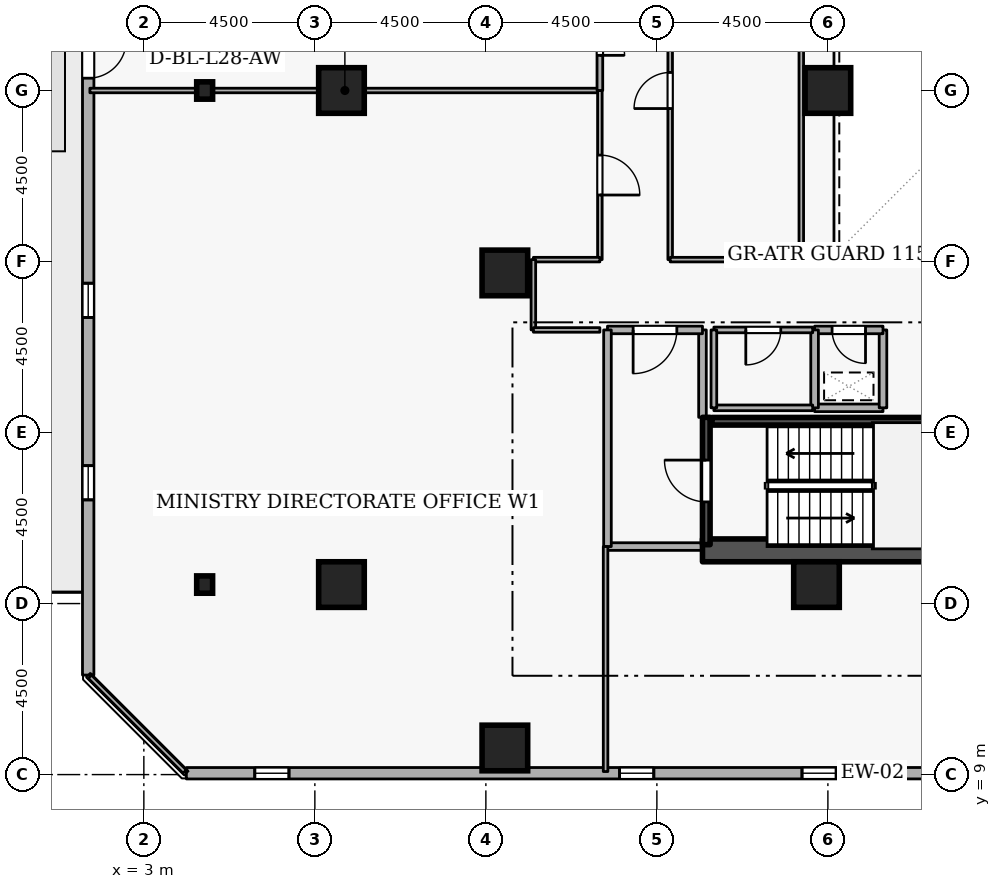
"""IFC4 building model, lengths in metres.
Left out: names, types, materials, properties, quantities, classifications, styles, units other than length and angle.
Written with IfcOpenShell. Run it as: python <this file> out.ifc"""

import sys

from ifc_helpers import new_model, si_unit, direction, frame, frame_2d, origin, origin_2d, place, context, subcontext, project, spatial, rectangle, i_section, extrude, element, fill, save


model = new_model("IFC4")
c1 = context("Model", 3, precision=1e-05, world=origin(), true_north=direction((0.0, 1.0)))
c2 = subcontext(c1, "Body", "Model", "MODEL_VIEW")
j1 = project(units=[si_unit("LENGTHUNIT", "METRE"), si_unit("PLANEANGLEUNIT", "RADIAN")], contexts=[c1])
p1 = place(None, origin())
s1 = spatial("IfcSite", under=j1, at=p1, CompositionType="ELEMENT")
p2 = place(p1, origin())
s2 = spatial("IfcBuilding", under=s1, at=p2, CompositionType="ELEMENT")
p3 = place(p2, frame((0.0, 0.0, 108.9)))
s3 = spatial("IfcBuildingStorey", under=s2, at=p3, CompositionType="ELEMENT", Elevation=108.9)
p4 = place(p3, frame((17.7, 14.9, 0.0), z_axis=(0.0, 0.0, 1.0), x_axis=(1.0, 0.0, 0.0)))
e1 = element("IfcWall", 1, at=p4, inside=s3, PredefinedType="SHEAR", context=c2, shape_type="SweptSolid", body=[
    extrude(rectangle(XDim=15.6, YDim=0.6, at=frame_2d((7.8, 0.0))), origin(), (0.0, 0.0, 1.0), 3.6),
])
for number, where, z_axis, x_axis in (
    (2, (12.5, 9.7, 0.0), (0.0, 0.0, 1.0), (1.0, 0.0, 0.0)),
    (3, (8.2, 14.0, 0.0), (0.0, 0.0, 1.0), (1.0, 0.0, 0.0)),
    (4, (8.2, 27.0, 0.0), (0.0, 0.0, 1.0), (1.0, 0.0, 0.0)),
    (5, (12.5, 22.2, 0.0), (0.0, 0.0, 1.0), (1.0, 0.0, 0.0)),
    (6, (20.7, 14.0, 0.0), (0.0, 0.0, 1.0), (1.0, 0.0, 0.0)),
    (7, (21.0, 27.0, 0.0), (0.0, 0.0, 1.0), (1.0, 0.0, 0.0)),
):
    element("IfcColumn", number, at=place(p3, frame(where, z_axis=z_axis, x_axis=x_axis)), inside=s3, PredefinedType="COLUMN", context=c2, shape_type="SweptSolid", body=[
        extrude(rectangle(XDim=1.2, YDim=1.2, at=origin_2d()), origin(), (0.0, 0.0, 1.0), 3.6),
    ])
for number, where, z_axis, x_axis in (
    (8, (4.6, 14.0, 0.0), (0.0, 0.0, 1.0), (1.0, 0.0, 0.0)),
    (9, (4.6, 27.0, 0.0), (0.0, 0.0, 1.0), (1.0, 0.0, 0.0)),
):
    element("IfcColumn", number, at=place(p3, frame(where, z_axis=z_axis, x_axis=x_axis)), inside=s3, PredefinedType="COLUMN", context=c2, shape_type="SweptSolid", body=[
        extrude(i_section(OverallWidth=0.418, OverallDepth=0.456, WebThickness=0.042, FlangeThickness=0.067, FilletRadius=0.015, at=origin_2d()), origin(), (0.0, 0.0, 1.0), 3.6),
    ])
p5 = place(p3, frame((4.119, 9.035, 0.0), z_axis=(0.0, 0.0, 1.0), x_axis=(0.999999998537, 5.4088042e-05, 0.0)))
e10 = element("IfcWall", 10, at=p5, inside=s3, PredefinedType="STANDARD", context=c2, shape_type="SweptSolid", body=[
    extrude(rectangle(XDim=36.11, YDim=0.3, at=frame_2d((18.055, 0.0))), origin(), (0.0, 0.0, 1.0), 2.7),
])
p6 = place(p5, frame((1.8, 0.0, 0.72)))
e11 = element("IfcOpeningElement", 11, at=p6, cuts=e10, PredefinedType="OPENING", context=c2, shape_type="SweptSolid", body=[
    extrude(rectangle(XDim=0.9, YDim=1.75, at=frame_2d((0.45, 0.875))), frame((0.0, 0.16, 0.0), z_axis=(0.0, -1.0, 0.0), x_axis=(1.0, 0.0, 0.0)), (0.0, 0.0, 1.0), 0.32),
])
p7 = place(p5, frame((11.4, 0.0, 0.72)))
e12 = element("IfcOpeningElement", 12, at=p7, cuts=e10, PredefinedType="OPENING", context=c2, shape_type="SweptSolid", body=[
    extrude(rectangle(XDim=0.9, YDim=1.75, at=frame_2d((0.45, 0.875))), frame((0.0, 0.16, 0.0), z_axis=(0.0, -1.0, 0.0), x_axis=(1.0, 0.0, 0.0)), (0.0, 0.0, 1.0), 0.32),
])
p8 = place(p5, frame((16.2, 0.0, 0.72)))
e13 = element("IfcOpeningElement", 13, at=p8, cuts=e10, PredefinedType="OPENING", context=c2, shape_type="SweptSolid", body=[
    extrude(rectangle(XDim=0.9, YDim=1.75, at=frame_2d((0.45, 0.875))), frame((0.0, 0.16, 0.0), z_axis=(0.0, -1.0, 0.0), x_axis=(1.0, 0.0, 0.0)), (0.0, 0.0, 1.0), 0.32),
])
p9 = place(p5, frame((25.8, 0.0, 0.72)))
e14 = element("IfcOpeningElement", 14, at=p9, cuts=e10, PredefinedType="OPENING", context=c2, shape_type="SweptSolid", body=[
    extrude(rectangle(XDim=0.9, YDim=1.75, at=frame_2d((0.45, 0.875))), frame((0.0, 0.16, 0.0), z_axis=(0.0, -1.0, 0.0), x_axis=(1.0, 0.0, 0.0)), (0.0, 0.0, 1.0), 0.32),
])
p10 = place(p5, frame((30.6, 0.0, 0.72)))
e15 = element("IfcOpeningElement", 15, at=p10, cuts=e10, PredefinedType="OPENING", context=c2, shape_type="SweptSolid", body=[
    extrude(rectangle(XDim=0.9, YDim=1.75, at=frame_2d((0.45, 0.875))), frame((0.0, 0.16, 0.0), z_axis=(0.0, -1.0, 0.0), x_axis=(1.0, 0.0, 0.0)), (0.0, 0.0, 1.0), 0.32),
])
p11 = place(p3, frame((1.537, 47.729, 0.0), z_axis=(0.0, 0.0, 1.0), x_axis=(-5.4088042e-05, -0.999999998537, 0.0)))
e16 = element("IfcWall", 16, at=p11, inside=s3, PredefinedType="STANDARD", context=c2, shape_type="SweptSolid", body=[
    extrude(rectangle(XDim=36.11, YDim=0.3, at=frame_2d((18.055, 0.0))), origin(), (0.0, 0.0, 1.0), 2.7),
])
p12 = place(p11, frame((19.405, 0.0, 0.0)))
e17 = element("IfcOpeningElement", 17, at=p12, cuts=e16, PredefinedType="OPENING", context=c2, shape_type="SweptSolid", body=[
    extrude(rectangle(XDim=1.0, YDim=2.08, at=frame_2d((0.5, 1.04))), frame((0.0, 0.16, 0.0), z_axis=(0.0, -1.0, 0.0), x_axis=(1.0, 0.0, 0.0)), (0.0, 0.0, 1.0), 0.32),
])
p13 = place(p11, frame((1.8, 0.0, 0.72)))
e18 = element("IfcOpeningElement", 18, at=p13, cuts=e16, PredefinedType="OPENING", context=c2, shape_type="SweptSolid", body=[
    extrude(rectangle(XDim=0.9, YDim=1.75, at=frame_2d((0.45, 0.875))), frame((0.0, 0.16, 0.0), z_axis=(0.0, -1.0, 0.0), x_axis=(1.0, 0.0, 0.0)), (0.0, 0.0, 1.0), 0.32),
])
p14 = place(p11, frame((11.4, 0.0, 0.72)))
e19 = element("IfcOpeningElement", 19, at=p14, cuts=e16, PredefinedType="OPENING", context=c2, shape_type="SweptSolid", body=[
    extrude(rectangle(XDim=0.9, YDim=1.75, at=frame_2d((0.45, 0.875))), frame((0.0, 0.16, 0.0), z_axis=(0.0, -1.0, 0.0), x_axis=(1.0, 0.0, 0.0)), (0.0, 0.0, 1.0), 0.32),
])
p15 = place(p11, frame((16.2, 0.0, 0.72)))
e20 = element("IfcOpeningElement", 20, at=p15, cuts=e16, PredefinedType="OPENING", context=c2, shape_type="SweptSolid", body=[
    extrude(rectangle(XDim=0.9, YDim=1.75, at=frame_2d((0.45, 0.875))), frame((0.0, 0.16, 0.0), z_axis=(0.0, -1.0, 0.0), x_axis=(1.0, 0.0, 0.0)), (0.0, 0.0, 1.0), 0.32),
])
p16 = place(p11, frame((25.8, 0.0, 0.72)))
e21 = element("IfcOpeningElement", 21, at=p16, cuts=e16, PredefinedType="OPENING", context=c2, shape_type="SweptSolid", body=[
    extrude(rectangle(XDim=0.9, YDim=1.75, at=frame_2d((0.45, 0.875))), frame((0.0, 0.16, 0.0), z_axis=(0.0, -1.0, 0.0), x_axis=(1.0, 0.0, 0.0)), (0.0, 0.0, 1.0), 0.32),
])
p17 = place(p11, frame((30.6, 0.0, 0.72)))
e22 = element("IfcOpeningElement", 22, at=p17, cuts=e16, PredefinedType="OPENING", context=c2, shape_type="SweptSolid", body=[
    extrude(rectangle(XDim=0.9, YDim=1.75, at=frame_2d((0.45, 0.875))), frame((0.0, 0.16, 0.0), z_axis=(0.0, -1.0, 0.0), x_axis=(1.0, 0.0, 0.0)), (0.0, 0.0, 1.0), 0.32),
])
p18 = place(p3, frame((17.8, 15.05, 0.0), z_axis=(0.0, 0.0, 1.0), x_axis=(0.0, 1.0, 0.0)))
e23 = element("IfcWall", 23, at=p18, inside=s3, PredefinedType="SHEAR", context=c2, shape_type="SweptSolid", body=[
    extrude(rectangle(XDim=3.35, YDim=0.2, at=frame_2d((1.675, 0.0))), origin(), (0.0, 0.0, 1.0), 3.6),
])
p19 = place(p18, frame((1.125, 0.0, 0.0)))
e24 = element("IfcOpeningElement", 24, at=p19, cuts=e23, PredefinedType="OPENING", context=c2, shape_type="SweptSolid", body=[
    extrude(rectangle(XDim=1.1, YDim=2.1, at=frame_2d((0.55, 1.05))), frame((0.0, 0.11, 0.0), z_axis=(0.0, -1.0, 0.0), x_axis=(1.0, 0.0, 0.0)), (0.0, 0.0, 1.0), 0.22),
])
p20 = place(p3, frame((25.05, 18.297, 0.0), z_axis=(0.0, 0.0, 1.0), x_axis=(-1.0, 0.0, 0.0)))
e25 = element("IfcWall", 25, at=p20, inside=s3, PredefinedType="SHEAR", context=c2, shape_type="SweptSolid", body=[
    extrude(rectangle(XDim=7.1, YDim=0.2, at=frame_2d((3.55, 0.0))), origin(), (0.0, 0.0, 1.0), 3.6),
])
p21 = place(p3, frame((15.2, 15.0, 0.0), z_axis=(0.0, 0.0, 1.0), x_axis=(1.0, 0.0, 0.0)))
e26 = element("IfcWall", 26, at=p21, inside=s3, PredefinedType="STANDARD", context=c2, shape_type="SweptSolid", body=[
    extrude(rectangle(XDim=2.5, YDim=0.2, at=frame_2d((1.25, 0.0))), origin(), (0.0, 0.0, 1.0), 3.34),
])
p22 = place(p3, frame((17.7, 18.4, 0.0), z_axis=(0.0, 0.0, 1.0), x_axis=(0.0, 1.0, 0.0)))
e27 = element("IfcWall", 27, at=p22, inside=s3, PredefinedType="STANDARD", context=c2, shape_type="SweptSolid", body=[
    extrude(rectangle(XDim=2.3, YDim=0.2, at=frame_2d((1.15, 0.0))), origin(), (0.0, 0.0, 1.0), 2.545),
])
p23 = place(p3, frame((17.7, 20.7, 0.0), z_axis=(0.0, 0.0, 1.0), x_axis=(-1.0, 0.0, 0.0)))
e28 = element("IfcWall", 28, at=p23, inside=s3, PredefinedType="STANDARD", context=c2, shape_type="SweptSolid", body=[
    extrude(rectangle(XDim=2.5, YDim=0.2, at=frame_2d((1.25, 0.0))), origin(), (0.0, 0.0, 1.0), 3.34),
])
p24 = place(p23, frame((0.675, 0.0, 0.0)))
e29 = element("IfcOpeningElement", 29, at=p24, cuts=e28, PredefinedType="OPENING", context=c2, shape_type="SweptSolid", body=[
    extrude(rectangle(XDim=1.15, YDim=2.1, at=frame_2d((0.575, 1.05))), frame((0.0, 0.11, 0.0), z_axis=(0.0, -1.0, 0.0), x_axis=(1.0, 0.0, 0.0)), (0.0, 0.0, 1.0), 0.22),
])
p25 = place(p3, frame((15.2, 20.7, 0.0), z_axis=(0.0, 0.0, 1.0), x_axis=(0.0, -1.0, 0.0)))
e30 = element("IfcWall", 30, at=p25, inside=s3, PredefinedType="STANDARD", context=c2, shape_type="SweptSolid", body=[
    extrude(rectangle(XDim=5.7, YDim=0.2, at=frame_2d((2.85, 0.0))), origin(), (0.0, 0.0, 1.0), 3.34),
])
p26 = place(p3, frame((20.65, 18.65, 0.0), z_axis=(0.0, 0.0, 1.0), x_axis=(1.0, 0.0, 0.0)))
e31 = element("IfcWall", 31, at=p26, inside=s3, PredefinedType="STANDARD", context=c2, shape_type="SweptSolid", body=[
    extrude(rectangle(XDim=1.8, YDim=0.2, at=frame_2d((0.9, 0.0))), origin(), (0.0, 0.0, 1.0), 3.34),
])
p27 = place(p3, frame((22.45, 18.65, 0.0), z_axis=(0.0, 0.0, 1.0), x_axis=(0.0, 1.0, 0.0)))
e32 = element("IfcWall", 32, at=p27, inside=s3, PredefinedType="STANDARD", context=c2, shape_type="SweptSolid", body=[
    extrude(rectangle(XDim=2.05, YDim=0.2, at=frame_2d((1.025, 0.0))), origin(), (0.0, 0.0, 1.0), 3.34),
])
p28 = place(p3, frame((22.45, 20.7, 0.0), z_axis=(0.0, 0.0, 1.0), x_axis=(-1.0, 0.0, 0.0)))
e33 = element("IfcWall", 33, at=p28, inside=s3, PredefinedType="STANDARD", context=c2, shape_type="SweptSolid", body=[
    extrude(rectangle(XDim=1.8, YDim=0.2, at=frame_2d((0.9, 0.0))), origin(), (0.0, 0.0, 1.0), 3.34),
])
p29 = place(p28, frame((0.46, 0.0, 0.0)))
e34 = element("IfcOpeningElement", 34, at=p29, cuts=e33, PredefinedType="OPENING", context=c2, shape_type="SweptSolid", body=[
    extrude(rectangle(XDim=0.88, YDim=2.04, at=frame_2d((0.44, 1.02))), frame((0.0, 0.11, 0.0), z_axis=(0.0, -1.0, 0.0), x_axis=(1.0, 0.0, 0.0)), (0.0, 0.0, 1.0), 0.22),
])
p30 = place(p3, frame((20.65, 20.7, 0.0), z_axis=(0.0, 0.0, 1.0), x_axis=(0.0, -1.0, 0.0)))
e35 = element("IfcWall", 35, at=p30, inside=s3, PredefinedType="STANDARD", context=c2, shape_type="SweptSolid", body=[
    extrude(rectangle(XDim=2.05, YDim=0.2, at=frame_2d((1.025, 0.0))), origin(), (0.0, 0.0, 1.0), 3.34),
])
p31 = place(p3, frame((18.0, 18.65, 0.0), z_axis=(0.0, 0.0, 1.0), x_axis=(1.0, 0.0, 0.0)))
e36 = element("IfcWall", 36, at=p31, inside=s3, PredefinedType="PARTITIONING", context=c2, shape_type="SweptSolid", body=[
    extrude(rectangle(XDim=2.6, YDim=0.15, at=frame_2d((1.3, 0.0))), origin(), (0.0, 0.0, 1.0), 3.34),
])
p32 = place(p3, frame((20.6, 20.7, 0.0), z_axis=(0.0, 0.0, 1.0), x_axis=(-1.0, 0.0, 0.0)))
e37 = element("IfcWall", 37, at=p32, inside=s3, PredefinedType="PARTITIONING", context=c2, shape_type="SweptSolid", body=[
    extrude(rectangle(XDim=2.6, YDim=0.15, at=frame_2d((1.3, 0.0))), origin(), (0.0, 0.0, 1.0), 3.34),
])
p33 = place(p32, frame((0.84, 0.0, 0.0)))
e38 = element("IfcOpeningElement", 38, at=p33, cuts=e37, PredefinedType="OPENING", context=c2, shape_type="SweptSolid", body=[
    extrude(rectangle(XDim=0.92, YDim=2.08, at=frame_2d((0.46, 1.04))), frame((0.0, 0.085, 0.0), z_axis=(0.0, -1.0, 0.0), x_axis=(1.0, 0.0, 0.0)), (0.0, 0.0, 1.0), 0.17),
])
p34 = place(p3, frame((18.0, 20.7, 0.0), z_axis=(0.0, 0.0, 1.0), x_axis=(0.0, -1.0, 0.0)))
e39 = element("IfcWall", 39, at=p34, inside=s3, PredefinedType="PARTITIONING", context=c2, shape_type="SweptSolid", body=[
    extrude(rectangle(XDim=2.05, YDim=0.15, at=frame_2d((1.025, 0.0))), origin(), (0.0, 0.0, 1.0), 2.545),
])
p35 = place(p3, frame((1.58, 27.0, 0.0), z_axis=(0.0, 0.0, 1.0), x_axis=(1.0, 0.0, 0.0)))
e40 = element("IfcWall", 40, at=p35, inside=s3, PredefinedType="PARTITIONING", context=c2, shape_type="SweptSolid", body=[
    extrude(rectangle(XDim=13.42, YDim=0.12, at=frame_2d((6.71, 0.0))), origin(), (0.0, 0.0, 1.0), 2.882),
])
p36 = place(p3, frame((15.0, 27.0, 0.0), z_axis=(0.0, 0.0, 1.0), x_axis=(0.0, -1.0, 0.0)))
e41 = element("IfcWall", 41, at=p36, inside=s3, PredefinedType="PARTITIONING", context=c2, shape_type="SweptSolid", body=[
    extrude(rectangle(XDim=4.45, YDim=0.12, at=frame_2d((2.225, 0.0))), origin(), (0.0, 0.0, 1.0), 3.34),
])
p37 = place(p36, frame((1.7, 0.0, 0.0)))
e42 = element("IfcOpeningElement", 42, at=p37, cuts=e41, PredefinedType="OPENING", context=c2, shape_type="SweptSolid", body=[
    extrude(rectangle(XDim=1.05, YDim=2.1, at=frame_2d((0.525, 1.05))), frame((0.0, 0.07, 0.0), z_axis=(0.0, -1.0, 0.0), x_axis=(1.0, 0.0, 0.0)), (0.0, 0.0, 1.0), 0.14),
])
p38 = place(p3, frame((15.0, 22.55, 0.0), z_axis=(0.0, 0.0, 1.0), x_axis=(-1.0, 0.0, 0.0)))
e43 = element("IfcWall", 43, at=p38, inside=s3, PredefinedType="PARTITIONING", context=c2, shape_type="SweptSolid", body=[
    extrude(rectangle(XDim=1.75, YDim=0.12, at=frame_2d((0.875, 0.0))), origin(), (0.0, 0.0, 1.0), 3.34),
])
p39 = place(p3, frame((13.25, 22.55, 0.0), z_axis=(0.0, 0.0, 1.0), x_axis=(0.0, -1.0, 0.0)))
e44 = element("IfcWall", 44, at=p39, inside=s3, PredefinedType="PARTITIONING", context=c2, shape_type="SweptSolid", body=[
    extrude(rectangle(XDim=1.85, YDim=0.12, at=frame_2d((0.925, 0.0))), origin(), (0.0, 0.0, 1.0), 3.34),
])
p40 = place(p3, frame((13.25, 20.7, 0.0), z_axis=(0.0, 0.0, 1.0), x_axis=(1.0, 0.0, 0.0)))
e45 = element("IfcWall", 45, at=p40, inside=s3, PredefinedType="PARTITIONING", context=c2, shape_type="SweptSolid", body=[
    extrude(rectangle(XDim=1.75, YDim=0.12, at=frame_2d((0.875, 0.0))), origin(), (0.0, 0.0, 1.0), 3.34),
])
p41 = place(p3, frame((15.15, 15.0, 0.0), z_axis=(0.0, 0.0, 1.0), x_axis=(0.0, -1.0, 0.0)))
e46 = element("IfcWall", 46, at=p41, inside=s3, PredefinedType="PARTITIONING", context=c2, shape_type="SweptSolid", body=[
    extrude(rectangle(XDim=5.92, YDim=0.12, at=frame_2d((2.96, 0.0))), origin(), (0.0, 0.0, 1.0), 3.34),
])
p42 = place(p3, frame((4.075, 9.08, 0.0), z_axis=(0.0, 0.0, 1.0), x_axis=(-0.707106781187, 0.707106781187, 0.0)))
e47 = element("IfcWall", 47, at=p42, inside=s3, PredefinedType="PARTITIONING", context=c2, shape_type="SweptSolid", body=[
    extrude(rectangle(XDim=3.528, YDim=0.12, at=frame_2d((1.764, 0.0))), origin(), (0.0, 0.0, 1.0), 3.34),
])
p43 = place(p3, frame((15.0, 30.15, 0.0), z_axis=(0.0, 0.0, 1.0), x_axis=(0.0, -1.0, 0.0)))
e48 = element("IfcWall", 48, at=p43, inside=s3, PredefinedType="PARTITIONING", context=c2, shape_type="SweptSolid", body=[
    extrude(rectangle(XDim=3.15, YDim=0.15, at=frame_2d((1.575, 0.0))), origin(), (0.0, 0.0, 1.0), 3.34),
])
p44 = place(p43, frame((0.925, 0.0, 0.0)))
e49 = element("IfcOpeningElement", 49, at=p44, cuts=e48, PredefinedType="OPENING", context=c2, shape_type="SweptSolid", body=[
    extrude(rectangle(XDim=1.3, YDim=2.12, at=frame_2d((0.65, 1.06))), frame((0.0, 0.085, 0.0), z_axis=(0.0, -1.0, 0.0), x_axis=(1.0, 0.0, 0.0)), (0.0, 0.0, 1.0), 0.17),
])
p45 = place(p3, frame((16.85, 22.55, 0.0), z_axis=(0.0, 0.0, 1.0), x_axis=(0.0, 1.0, 0.0)))
e50 = element("IfcWall", 50, at=p45, inside=s3, PredefinedType="PARTITIONING", context=c2, shape_type="SweptSolid", body=[
    extrude(rectangle(XDim=8.9, YDim=0.12, at=frame_2d((4.45, 0.0))), origin(), (0.0, 0.0, 1.0), 3.34),
])
p46 = place(p45, frame((3.975, 0.0, 0.0)))
e51 = element("IfcOpeningElement", 51, at=p46, cuts=e50, PredefinedType="OPENING", context=c2, shape_type="SweptSolid", body=[
    extrude(rectangle(XDim=0.95, YDim=2.1, at=frame_2d((0.475, 1.05))), frame((0.0, 0.07, 0.0), z_axis=(0.0, -1.0, 0.0), x_axis=(1.0, 0.0, 0.0)), (0.0, 0.0, 1.0), 0.14),
])
p47 = place(p3, frame((20.3, 31.45, 0.0), z_axis=(0.0, 0.0, 1.0), x_axis=(0.0, -1.0, 0.0)))
e52 = element("IfcWall", 52, at=p47, inside=s3, PredefinedType="PARTITIONING", context=c2, shape_type="SweptSolid", body=[
    extrude(rectangle(XDim=8.9, YDim=0.12, at=frame_2d((4.45, 0.0))), origin(), (0.0, 0.0, 1.0), 3.34),
])
p48 = place(p3, frame((20.3, 22.55, 0.0), z_axis=(0.0, 0.0, 1.0), x_axis=(-1.0, 0.0, 0.0)))
e53 = element("IfcWall", 53, at=p48, inside=s3, PredefinedType="PARTITIONING", context=c2, shape_type="SweptSolid", body=[
    extrude(rectangle(XDim=3.45, YDim=0.12, at=frame_2d((1.725, 0.0))), origin(), (0.0, 0.0, 1.0), 3.34),
])
p49 = place(p6, origin())
e54 = element("IfcWindow", 54, at=p49, inside=s3, PartitioningType="SINGLE_PANEL", PredefinedType="WINDOW", context=c2, shape_type="SweptSolid", body=[
    extrude(rectangle(XDim=0.9, YDim=1.75, at=frame_2d((0.45, 0.875))), frame((0.0, 0.03, 0.0), z_axis=(0.0, -1.0, 0.0), x_axis=(1.0, 0.0, 0.0)), (0.0, 0.0, 1.0), 0.06),
])
fill(e11, e54)
p50 = place(p7, origin())
e55 = element("IfcWindow", 55, at=p50, inside=s3, PartitioningType="SINGLE_PANEL", PredefinedType="WINDOW", context=c2, shape_type="SweptSolid", body=[
    extrude(rectangle(XDim=0.9, YDim=1.75, at=frame_2d((0.45, 0.875))), frame((0.0, 0.03, 0.0), z_axis=(0.0, -1.0, 0.0), x_axis=(1.0, 0.0, 0.0)), (0.0, 0.0, 1.0), 0.06),
])
fill(e12, e55)
p51 = place(p8, origin())
e56 = element("IfcWindow", 56, at=p51, inside=s3, PartitioningType="SINGLE_PANEL", PredefinedType="WINDOW", context=c2, shape_type="SweptSolid", body=[
    extrude(rectangle(XDim=0.9, YDim=1.75, at=frame_2d((0.45, 0.875))), frame((0.0, 0.03, 0.0), z_axis=(0.0, -1.0, 0.0), x_axis=(1.0, 0.0, 0.0)), (0.0, 0.0, 1.0), 0.06),
])
fill(e13, e56)
p52 = place(p12, origin())
e57 = element("IfcDoor", 57, at=p52, inside=s3, OperationType="SINGLE_SWING_LEFT", PredefinedType="DOOR", context=c2, shape_type="SweptSolid", body=[
    extrude(rectangle(XDim=1.0, YDim=2.08, at=frame_2d((0.5, 1.04))), frame((0.0, 0.025, 0.0), z_axis=(0.0, -1.0, 0.0), x_axis=(1.0, 0.0, 0.0)), (0.0, 0.0, 1.0), 0.05),
])
fill(e17, e57)
p53 = place(p16, origin())
e58 = element("IfcWindow", 58, at=p53, inside=s3, PartitioningType="SINGLE_PANEL", PredefinedType="WINDOW", context=c2, shape_type="SweptSolid", body=[
    extrude(rectangle(XDim=0.9, YDim=1.75, at=frame_2d((0.45, 0.875))), frame((0.0, 0.03, 0.0), z_axis=(0.0, -1.0, 0.0), x_axis=(1.0, 0.0, 0.0)), (0.0, 0.0, 1.0), 0.06),
])
fill(e21, e58)
p54 = place(p17, origin())
e59 = element("IfcWindow", 59, at=p54, inside=s3, PartitioningType="SINGLE_PANEL", PredefinedType="WINDOW", context=c2, shape_type="SweptSolid", body=[
    extrude(rectangle(XDim=0.9, YDim=1.75, at=frame_2d((0.45, 0.875))), frame((0.0, 0.03, 0.0), z_axis=(0.0, -1.0, 0.0), x_axis=(1.0, 0.0, 0.0)), (0.0, 0.0, 1.0), 0.06),
])
fill(e22, e59)
p55 = place(p19, origin())
e60 = element("IfcDoor", 60, at=p55, inside=s3, OperationType="SINGLE_SWING_RIGHT", PredefinedType="DOOR", context=c2, shape_type="SweptSolid", body=[
    extrude(rectangle(XDim=1.1, YDim=2.1, at=frame_2d((0.55, 1.05))), frame((0.0, 0.025, 0.0), z_axis=(0.0, -1.0, 0.0), x_axis=(1.0, 0.0, 0.0)), (0.0, 0.0, 1.0), 0.05),
])
fill(e24, e60)
p56 = place(p24, origin())
e61 = element("IfcDoor", 61, at=p56, inside=s3, OperationType="SINGLE_SWING_RIGHT", PredefinedType="DOOR", context=c2, shape_type="SweptSolid", body=[
    extrude(rectangle(XDim=1.15, YDim=2.1, at=frame_2d((0.575, 1.05))), frame((0.0, 0.025, 0.0), z_axis=(0.0, -1.0, 0.0), x_axis=(1.0, 0.0, 0.0)), (0.0, 0.0, 1.0), 0.05),
])
fill(e29, e61)
p57 = place(p29, origin())
e62 = element("IfcDoor", 62, at=p57, inside=s3, OperationType="SINGLE_SWING_LEFT", PredefinedType="DOOR", context=c2, shape_type="SweptSolid", body=[
    extrude(rectangle(XDim=0.88, YDim=2.04, at=frame_2d((0.44, 1.02))), frame((0.0, 0.025, 0.0), z_axis=(0.0, -1.0, 0.0), x_axis=(1.0, 0.0, 0.0)), (0.0, 0.0, 1.0), 0.05),
])
fill(e34, e62)
p58 = place(p33, origin())
e63 = element("IfcDoor", 63, at=p58, inside=s3, OperationType="SINGLE_SWING_RIGHT", PredefinedType="DOOR", context=c2, shape_type="SweptSolid", body=[
    extrude(rectangle(XDim=0.92, YDim=2.08, at=frame_2d((0.46, 1.04))), frame((0.0, 0.025, 0.0), z_axis=(0.0, -1.0, 0.0), x_axis=(1.0, 0.0, 0.0)), (0.0, 0.0, 1.0), 0.05),
])
fill(e38, e63)
p59 = place(p37, origin())
e64 = element("IfcDoor", 64, at=p59, inside=s3, OperationType="SINGLE_SWING_RIGHT", PredefinedType="DOOR", context=c2, shape_type="SweptSolid", body=[
    extrude(rectangle(XDim=1.05, YDim=2.1, at=frame_2d((0.525, 1.05))), frame((0.0, 0.025, 0.0), z_axis=(0.0, -1.0, 0.0), x_axis=(1.0, 0.0, 0.0)), (0.0, 0.0, 1.0), 0.05),
])
fill(e42, e64)
p60 = place(p44, origin())
e65 = element("IfcDoor", 65, at=p60, inside=s3, OperationType="DOUBLE_DOOR_SINGLE_SWING", PredefinedType="DOOR", context=c2, shape_type="SweptSolid", body=[
    extrude(rectangle(XDim=1.3, YDim=2.12, at=frame_2d((0.65, 1.06))), frame((0.0, 0.025, 0.0), z_axis=(0.0, -1.0, 0.0), x_axis=(1.0, 0.0, 0.0)), (0.0, 0.0, 1.0), 0.05),
])
fill(e49, e65)
p61 = place(p46, origin())
e66 = element("IfcDoor", 66, at=p61, inside=s3, OperationType="SINGLE_SWING_LEFT", PredefinedType="DOOR", context=c2, shape_type="SweptSolid", body=[
    extrude(rectangle(XDim=0.95, YDim=2.1, at=frame_2d((0.475, 1.05))), frame((0.0, 0.025, 0.0), z_axis=(0.0, -1.0, 0.0), x_axis=(1.0, 0.0, 0.0)), (0.0, 0.0, 1.0), 0.05),
])
fill(e51, e66)
save(model, sys.argv[1])
